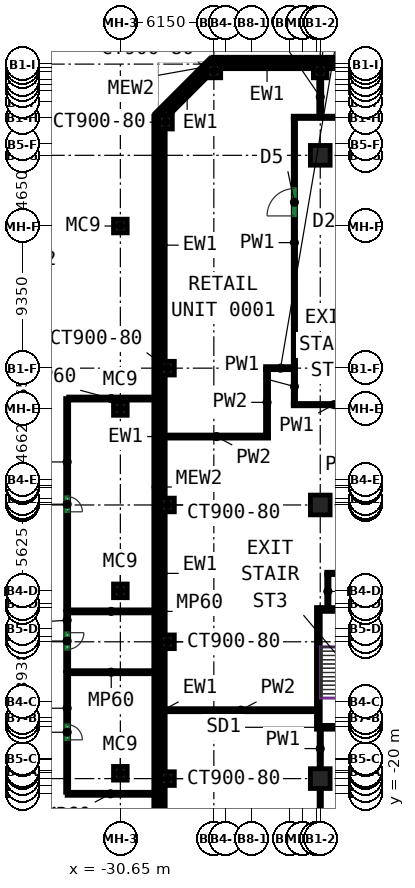
"""IFC4 building model, lengths in metres.
Left out: names, types, materials, properties, quantities, classifications, styles, units other than length and angle.
Written with IfcOpenShell. Run it as: python <this file> out.ifc"""

import sys

from ifc_helpers import new_model, si_unit, direction, frame, frame_2d, origin, origin_2d, place, context, subcontext, project, spatial, rectangle, extrude, source, transform, mapped, element, fill, save


model = new_model("IFC4")
c1 = context("Model", 3, precision=1e-05, world=origin(), true_north=direction((0.0, 1.0)))
c2 = subcontext(c1, "Body", "Model", "MODEL_VIEW")
j1 = project(units=[si_unit("LENGTHUNIT", "METRE"), si_unit("PLANEANGLEUNIT", "RADIAN")], contexts=[c1])
p1 = place(None, origin())
s1 = spatial("IfcSite", under=j1, at=p1, CompositionType="ELEMENT")
p2 = place(p1, origin())
s2 = spatial("IfcBuilding", under=s1, at=p2, CompositionType="ELEMENT")
p3 = place(p2, origin())
s3 = spatial("IfcBuildingStorey", under=s2, at=p3, CompositionType="ELEMENT", Elevation=0.0)
m1 = source(origin(), c2, "Body", "SweptSolid", [
    extrude(rectangle(XDim=0.9, YDim=0.9, at=origin_2d()), origin(), (0.0, 0.0, 1.0), 8.6),
])
for number, where, z_axis, x_axis in (
    (1, (-27.682, 24.182, 0.0), (0.0, 0.0, 1.0), (1.0, 0.0, 0.0)),
    (2, (-27.55, -19.0, 0.0), (0.0, 0.0, 1.0), (1.0, 0.0, 0.0)),
    (3, (-27.55, -10.0, 0.0), (0.0, 0.0, 1.0), (1.0, 0.0, 0.0)),
    (4, (-27.55, -1.0, 0.0), (0.0, 0.0, 1.0), (1.0, 0.0, 0.0)),
    (5, (-27.55, 8.0, 0.0), (0.0, 0.0, 1.0), (1.0, 0.0, 0.0)),
    (6, (-24.5, 27.55, 0.0), (0.0, 0.0, 1.0), (1.0, 0.0, 0.0)),
):
    element("IfcColumn", number, at=place(p3, frame(where, z_axis=z_axis, x_axis=x_axis)), inside=s3, PredefinedType="COLUMN", context=c2, shape_type="MappedRepresentation", body=[
        mapped(m1, transform((0.0, 0.0, 0.0))),
    ])
m2 = source(origin(), c2, "Body", "SweptSolid", [
    extrude(rectangle(XDim=1.3, YDim=1.3, at=origin_2d()), origin(), (0.0, 0.0, 1.0), 8.6),
])
for number, where, z_axis, x_axis in (
    (7, (-17.5, -19.0, 0.0), (0.0, 0.0, 1.0), (1.0, 0.0, 0.0)),
    (8, (-17.5, -1.0, 0.0), (0.0, 0.0, 1.0), (1.0, 0.0, 0.0)),
    (9, (-17.5, 8.0, 0.0), (0.0, 0.0, 1.0), (1.0, 0.0, 0.0)),
    (10, (-17.5, 22.0, 0.0), (0.0, 0.0, 1.0), (1.0, 0.0, 0.0)),
):
    element("IfcColumn", number, at=place(p3, frame(where, z_axis=z_axis, x_axis=x_axis)), inside=s3, PredefinedType="COLUMN", context=c2, shape_type="MappedRepresentation", body=[
        mapped(m2, transform((0.0, 0.0, 0.0))),
    ])
p4 = place(p3, frame((-17.5, 27.55, 0.0), z_axis=(0.0, 0.0, 1.0), x_axis=(1.0, 0.0, 0.0)))
e11 = element("IfcColumn", 11, at=p4, inside=s3, PredefinedType="COLUMN", context=c2, shape_type="MappedRepresentation", body=[
    mapped(m1, transform((0.0, 0.0, 0.0))),
])
m3 = source(origin(), c2, "Body", "SweptSolid", [
    extrude(rectangle(XDim=8.0, YDim=0.25, at=frame_2d((4.0, 0.0))), origin(), (0.0, 0.0, 1.0), 8.6),
])
p5 = place(p3, frame((-17.625, -15.75, 0.0), z_axis=(0.0, 0.0, 1.0), x_axis=(0.0, 1.0, 0.0)))
e12 = element("IfcWall", 12, at=p5, inside=s3, PredefinedType="SHEAR", context=c2, shape_type="MappedRepresentation", body=[
    mapped(m3, transform((0.0, 0.0, 0.0))),
])
m4 = source(origin(), c2, "Body", "SweptSolid", [
    extrude(rectangle(XDim=3.7, YDim=0.25, at=frame_2d((1.85, 0.0))), origin(), (0.0, 0.0, 1.0), 8.6),
])
p6 = place(p3, frame((-17.5, -15.625, 0.0), z_axis=(0.0, 0.0, 1.0), x_axis=(1.0, 0.0, 0.0)))
e13 = element("IfcWall", 13, at=p6, inside=s3, PredefinedType="SHEAR", context=c2, shape_type="MappedRepresentation", body=[
    mapped(m4, transform((0.0, 0.0, 0.0))),
])
p7 = place(p6, frame((2.5, 0.0, 0.0)))
e14 = element("IfcOpeningElement", 14, at=p7, cuts=e13, PredefinedType="OPENING", context=c2, shape_type="SweptSolid", body=[
    extrude(rectangle(XDim=1.2, YDim=2.1, at=frame_2d((0.6, 1.05))), frame((0.0, 0.135, 0.0), z_axis=(0.0, -1.0, 0.0), x_axis=(1.0, 0.0, 0.0)), (0.0, 0.0, 1.0), 0.27),
])
p8 = place(p3, frame((-17.5, -7.875, 0.0), z_axis=(0.0, 0.0, 1.0), x_axis=(1.0, 0.0, 0.0)))
e15 = element("IfcWall", 15, at=p8, inside=s3, PredefinedType="SHEAR", context=c2, shape_type="MappedRepresentation", body=[
    mapped(m4, transform((0.0, 0.0, 0.0))),
])
m5 = source(origin(), c2, "Body", "SweptSolid", [
    extrude(rectangle(XDim=0.9, YDim=0.9, at=origin_2d()), origin(), (0.0, 0.0, 1.0), 8.6),
])
for number, where, z_axis, x_axis in (
    (16, (-30.65, -18.65, 0.0), (0.0, 0.0, 1.0), (1.0, 0.0, 0.0)),
    (17, (-30.65, -6.65, 0.0), (0.0, 0.0, 1.0), (1.0, 0.0, 0.0)),
    (18, (-30.65, 5.35, 0.0), (0.0, 0.0, 1.0), (1.0, 0.0, 0.0)),
    (19, (-30.65, 17.35, 0.0), (0.0, 0.0, 1.0), (1.0, 0.0, 0.0)),
):
    element("IfcColumn", number, at=place(p3, frame(where, z_axis=z_axis, x_axis=x_axis)), inside=s3, PredefinedType="COLUMN", context=c2, shape_type="MappedRepresentation", body=[
        mapped(m5, transform((0.0, 0.0, 0.0))),
    ])
m6 = source(origin(), c2, "Body", "SweptSolid", [
    extrude(rectangle(XDim=6.1, YDim=0.3, at=frame_2d((3.05, 0.0))), origin(), (0.0, 0.0, 1.0), 8.6),
])
for number, where, z_axis, x_axis in (
    (20, (-10.95, 27.85, 0.0), (0.0, 0.0, 1.0), (-1.0, 0.0, 0.0)),
    (21, (-17.95, 27.85, 0.0), (0.0, 0.0, 1.0), (-1.0, 0.0, 0.0)),
):
    element("IfcWall", number, at=place(p3, frame(where, z_axis=z_axis, x_axis=x_axis)), inside=s3, PredefinedType="SOLIDWALL", context=c2, shape_type="MappedRepresentation", body=[
        mapped(m6, transform((0.0, 0.0, 0.0))),
    ])
m7 = source(origin(), c2, "Body", "SweptSolid", [
    extrude(rectangle(XDim=3.359, YDim=0.3, at=frame_2d((1.679, 0.0))), origin(), (0.0, 0.0, 1.0), 8.6),
])
p9 = place(p3, frame((-25.069, 27.219, 0.0), z_axis=(0.0, 0.0, 1.0), x_axis=(-0.707143122278, -0.707070438228, 0.0)))
e22 = element("IfcWall", 22, at=p9, inside=s3, PredefinedType="SOLIDWALL", context=c2, shape_type="MappedRepresentation", body=[
    mapped(m7, transform((0.0, 0.0, 0.0))),
])
m8 = source(origin(), c2, "Body", "SweptSolid", [
    extrude(rectangle(XDim=15.282, YDim=0.3, at=frame_2d((7.641, 0.0))), origin(), (0.0, 0.0, 1.0), 8.6),
])
p10 = place(p3, frame((-27.85, 23.732, 0.0), z_axis=(0.0, 0.0, 1.0), x_axis=(0.0, -1.0, 0.0)))
e23 = element("IfcWall", 23, at=p10, inside=s3, PredefinedType="SOLIDWALL", context=c2, shape_type="MappedRepresentation", body=[
    mapped(m8, transform((0.0, 0.0, 0.0))),
])
m9 = source(origin(), c2, "Body", "SweptSolid", [
    extrude(rectangle(XDim=8.1, YDim=0.3, at=frame_2d((4.05, 0.0))), origin(), (0.0, 0.0, 1.0), 8.6),
])
for number, where, z_axis, x_axis in (
    (24, (-27.85, 7.55, 0.0), (0.0, 0.0, 1.0), (0.0, -1.0, 0.0)),
    (25, (-27.85, -1.45, 0.0), (0.0, 0.0, 1.0), (0.0, -1.0, 0.0)),
    (26, (-27.85, -10.45, 0.0), (0.0, 0.0, 1.0), (0.0, -1.0, 0.0)),
):
    element("IfcWall", number, at=place(p3, frame(where, z_axis=z_axis, x_axis=x_axis)), inside=s3, PredefinedType="SOLIDWALL", context=c2, shape_type="MappedRepresentation", body=[
        mapped(m9, transform((0.0, 0.0, 0.0))),
    ])
m10 = source(origin(), c2, "Body", "SweptSolid", [
    extrude(rectangle(XDim=4.6, YDim=0.3, at=frame_2d((2.3, 0.0))), origin(), (0.0, 0.0, 1.0), 8.6),
])
p11 = place(p3, frame((-27.85, -19.45, 0.0), z_axis=(0.0, 0.0, 1.0), x_axis=(0.0, -1.0, 0.0)))
e27 = element("IfcWall", 27, at=p11, inside=s3, PredefinedType="SOLIDWALL", context=c2, shape_type="MappedRepresentation", body=[
    mapped(m10, transform((0.0, 0.0, 0.0))),
])
m11 = source(origin(), c2, "Body", "SweptSolid", [
    extrude(rectangle(XDim=48.762, YDim=0.3, at=frame_2d((24.381, 0.0))), origin(), (0.0, 0.0, 1.0), 8.6),
])
p12 = place(p3, frame((24.2, 28.3, 0.0), z_axis=(0.0, 0.0, 1.0), x_axis=(-1.0, 0.0, 0.0)))
e28 = element("IfcWall", 28, at=p12, inside=s3, PredefinedType="SOLIDWALL", context=c2, shape_type="MappedRepresentation", body=[
    mapped(m11, transform((0.0, 0.0, 0.0))),
])
m12 = source(origin(), c2, "Body", "SweptSolid", [
    extrude(rectangle(XDim=5.074, YDim=0.3, at=frame_2d((2.537, 0.0))), origin(), (0.0, 0.0, 1.0), 8.6),
])
p13 = place(p3, frame((-24.668, 28.256, 0.0), z_axis=(0.0, 0.0, 1.0), x_axis=(-0.707106781187, -0.707106781187, 0.0)))
e29 = element("IfcWall", 29, at=p13, inside=s3, PredefinedType="SOLIDWALL", context=c2, shape_type="MappedRepresentation", body=[
    mapped(m12, transform((0.0, 0.0, 0.0))),
])
p14 = place(p3, frame((-28.3, 24.562, 0.0), z_axis=(0.0, 0.0, 1.0), x_axis=(0.0, -1.0, 0.0)))
e30 = element("IfcWall", 30, at=p14, inside=s3, PredefinedType="SOLIDWALL", context=c2, shape_type="MappedRepresentation", body=[
    mapped(m11, transform((0.0, 0.0, 0.0))),
])
p15 = place(p3, frame((-17.5, -27.1, 0.0), z_axis=(0.0, 0.0, 1.0), x_axis=(0.0, 1.0, 0.0)))
e31 = element("IfcWall", 31, at=p15, inside=s3, PredefinedType="PARTITIONING", context=c2, shape_type="SweptSolid", body=[
    extrude(rectangle(XDim=7.45, YDim=0.15, at=frame_2d((3.725, 0.0))), origin(), (0.0, 0.0, 1.0), 7.95),
])
p16 = place(p15, frame((2.822, 0.0, 0.0)))
e32 = element("IfcOpeningElement", 32, at=p16, cuts=e31, PredefinedType="OPENING", context=c2, shape_type="SweptSolid", body=[
    extrude(rectangle(XDim=1.0, YDim=2.1, at=frame_2d((0.5, 1.05))), frame((0.0, 0.085, 0.0), z_axis=(0.0, -1.0, 0.0), x_axis=(1.0, 0.0, 0.0)), (0.0, 0.0, 1.0), 0.17),
])
p17 = place(p3, frame((-17.5, -18.35, 0.0), z_axis=(0.0, 0.0, 1.0), x_axis=(0.0, 1.0, 0.0)))
e33 = element("IfcWall", 33, at=p17, inside=s3, PredefinedType="PARTITIONING", context=c2, shape_type="SweptSolid", body=[
    extrude(rectangle(XDim=2.65, YDim=0.15, at=frame_2d((1.325, 0.0))), origin(), (0.0, 0.0, 1.0), 8.6),
])
p18 = place(p3, frame((-17.0, -5.575, 0.0), z_axis=(0.0, 0.0, 1.0), x_axis=(0.0, -1.0, 0.0)))
e34 = element("IfcWall", 34, at=p18, inside=s3, PredefinedType="PARTITIONING", context=c2, shape_type="SweptSolid", body=[
    extrude(rectangle(XDim=2.225, YDim=0.15, at=frame_2d((1.113, 0.0))), origin(), (0.0, 0.0, 1.0), 8.6),
])
p19 = place(p3, frame((-17.075, -5.5, 0.0), z_axis=(0.0, 0.0, 1.0), x_axis=(1.0, 0.0, 0.0)))
e35 = element("IfcWall", 35, at=p19, inside=s3, PredefinedType="PARTITIONING", context=c2, shape_type="SweptSolid", body=[
    extrude(rectangle(XDim=21.75, YDim=0.15, at=frame_2d((10.875, 0.0))), origin(), (0.0, 0.0, 1.0), 8.6),
])
p20 = place(p3, frame((-19.2, 8.09, 0.0), z_axis=(0.0, 0.0, 1.0), x_axis=(0.0, 1.0, 0.0)))
e36 = element("IfcWall", 36, at=p20, inside=s3, PredefinedType="PARTITIONING", context=c2, shape_type="SweptSolid", body=[
    extrude(rectangle(XDim=16.335, YDim=0.15, at=frame_2d((8.167, 0.0))), origin(), (0.0, 0.0, 1.0), 8.6),
])
p21 = place(p20, frame((9.924, 0.0, 0.0)))
e37 = element("IfcOpeningElement", 37, at=p21, cuts=e36, PredefinedType="OPENING", context=c2, shape_type="SweptSolid", body=[
    extrude(rectangle(XDim=1.8, YDim=2.1, at=frame_2d((0.9, 1.05))), frame((0.0, 0.085, 0.0), z_axis=(0.0, -1.0, 0.0), x_axis=(1.0, 0.0, 0.0)), (0.0, 0.0, 1.0), 0.17),
])
p22 = place(p3, frame((-19.275, 24.5, 0.0), z_axis=(0.0, 0.0, 1.0), x_axis=(1.0, 0.0, 0.0)))
e38 = element("IfcWall", 38, at=p22, inside=s3, PredefinedType="PARTITIONING", context=c2, shape_type="SweptSolid", body=[
    extrude(rectangle(XDim=40.35, YDim=0.15, at=frame_2d((20.175, 0.0))), origin(), (0.0, 0.0, 1.0), 7.95),
])
p23 = place(p22, frame((3.067, 0.0, 0.0)))
e39 = element("IfcOpeningElement", 39, at=p23, cuts=e38, PredefinedType="OPENING", context=c2, shape_type="SweptSolid", body=[
    extrude(rectangle(XDim=0.9, YDim=2.1, at=frame_2d((0.45, 1.05))), frame((0.0, 0.085, 0.0), z_axis=(0.0, -1.0, 0.0), x_axis=(1.0, 0.0, 0.0)), (0.0, 0.0, 1.0), 0.17),
])
p24 = place(p22, frame((14.169, 0.0, 0.0)))
e40 = element("IfcOpeningElement", 40, at=p24, cuts=e38, PredefinedType="OPENING", context=c2, shape_type="SweptSolid", body=[
    extrude(rectangle(XDim=1.0, YDim=2.1, at=frame_2d((0.5, 1.05))), frame((0.0, 0.085, 0.0), z_axis=(0.0, -1.0, 0.0), x_axis=(1.0, 0.0, 0.0)), (0.0, 0.0, 1.0), 0.17),
])
p25 = place(p22, frame((30.705, 0.0, 0.0)))
e41 = element("IfcOpeningElement", 41, at=p25, cuts=e38, PredefinedType="OPENING", context=c2, shape_type="SweptSolid", body=[
    extrude(rectangle(XDim=0.9, YDim=2.1, at=frame_2d((0.45, 1.05))), frame((0.0, 0.085, 0.0), z_axis=(0.0, -1.0, 0.0), x_axis=(1.0, 0.0, 0.0)), (0.0, 0.0, 1.0), 0.17),
])
p26 = place(p3, frame((-19.275, 5.6, 0.0), z_axis=(0.0, 0.0, 1.0), x_axis=(1.0, 0.0, 0.0)))
e42 = element("IfcWall", 42, at=p26, inside=s3, PredefinedType="PARTITIONING", context=c2, shape_type="SweptSolid", body=[
    extrude(rectangle(XDim=5.35, YDim=0.15, at=frame_2d((2.675, 0.0))), origin(), (0.0, 0.0, 1.0), 8.6),
])
p27 = place(p3, frame((-19.2, 5.675, 0.0), z_axis=(0.0, 0.0, 1.0), x_axis=(0.0, 1.0, 0.0)))
e43 = element("IfcWall", 43, at=p27, inside=s3, PredefinedType="PARTITIONING", context=c2, shape_type="SweptSolid", body=[
    extrude(rectangle(XDim=2.235, YDim=0.15, at=frame_2d((1.117, 0.0))), origin(), (0.0, 0.0, 1.0), 8.6),
])
p28 = place(p3, frame((-17.7, -14.5, 0.0), z_axis=(0.0, 0.0, 1.0), x_axis=(-1.0, 0.0, 0.0)))
e44 = element("IfcWall", 44, at=p28, inside=s3, PredefinedType="PARTITIONING", context=c2, shape_type="SweptSolid", body=[
    extrude(rectangle(XDim=10.05, YDim=0.2, at=frame_2d((5.025, 0.0))), origin(), (0.0, 0.0, 1.0), 8.6),
])
p29 = place(p3, frame((-21.1, 8.0, 0.0), z_axis=(0.0, 0.0, 1.0), x_axis=(1.0, 0.0, 0.0)))
e45 = element("IfcWall", 45, at=p29, inside=s3, PredefinedType="PARTITIONING", context=c2, shape_type="SweptSolid", body=[
    extrude(rectangle(XDim=1.974, YDim=0.2, at=frame_2d((0.987, 0.0))), origin(), (0.0, 0.0, 1.0), 7.95),
])
p30 = place(p3, frame((-21.0, 3.6, 0.0), z_axis=(0.0, 0.0, 1.0), x_axis=(0.0, 1.0, 0.0)))
e46 = element("IfcWall", 46, at=p30, inside=s3, PredefinedType="PARTITIONING", context=c2, shape_type="SweptSolid", body=[
    extrude(rectangle(XDim=4.3, YDim=0.2, at=frame_2d((2.15, 0.0))), origin(), (0.0, 0.0, 1.0), 8.6),
])
p31 = place(p3, frame((-27.75, 3.5, 0.0), z_axis=(0.0, 0.0, 1.0), x_axis=(1.0, 0.0, 0.0)))
e47 = element("IfcWall", 47, at=p31, inside=s3, PredefinedType="PARTITIONING", context=c2, shape_type="SweptSolid", body=[
    extrude(rectangle(XDim=6.85, YDim=0.2, at=frame_2d((3.425, 0.0))), origin(), (0.0, 0.0, 1.0), 8.6),
])
p32 = place(p3, frame((-17.5, 24.576, 0.0), z_axis=(0.0, 0.0, 1.0), x_axis=(0.0, 1.0, 0.0)))
e48 = element("IfcWall", 48, at=p32, inside=s3, PredefinedType="PARTITIONING", context=c2, shape_type="SweptSolid", body=[
    extrude(rectangle(XDim=2.524, YDim=0.2, at=frame_2d((1.262, 0.0))), origin(), (0.0, 0.0, 1.0), 7.95),
])
m13 = source(origin(), c2, "Body", "SweptSolid", [
    extrude(rectangle(XDim=5.7, YDim=0.2, at=frame_2d((2.85, 0.0))), origin(), (0.0, 0.0, 1.0), 7.7),
])
p33 = place(p3, frame((-34.15, -20.0, 0.0), z_axis=(0.0, 0.0, 1.0), x_axis=(1.0, 0.0, 0.0)))
e49 = element("IfcWall", 49, at=p33, inside=s3, PredefinedType="PARTITIONING", context=c2, shape_type="MappedRepresentation", body=[
    mapped(m13, transform((0.0, 0.0, 0.0))),
])
m14 = source(origin(), c2, "Body", "SweptSolid", [
    extrude(rectangle(XDim=7.9, YDim=0.2, at=frame_2d((3.95, 0.0))), origin(), (0.0, 0.0, 1.0), 7.7),
])
p34 = place(p3, frame((-34.15, -12.0, 0.0), z_axis=(0.0, 0.0, 1.0), x_axis=(0.0, -1.0, 0.0)))
e50 = element("IfcWall", 50, at=p34, inside=s3, PredefinedType="PARTITIONING", context=c2, shape_type="MappedRepresentation", body=[
    mapped(m14, transform((0.0, 0.0, 0.0))),
])
p35 = place(p34, frame((3.45, 0.0, 0.0)))
e51 = element("IfcOpeningElement", 51, at=p35, cuts=e50, PredefinedType="OPENING", context=c2, shape_type="SweptSolid", body=[
    extrude(rectangle(XDim=1.0, YDim=2.1, at=frame_2d((0.5, 1.05))), frame((0.0, 0.11, 0.0), z_axis=(0.0, -1.0, 0.0), x_axis=(1.0, 0.0, 0.0)), (0.0, 0.0, 1.0), 0.22),
])
m15 = source(origin(), c2, "Body", "SweptSolid", [
    extrude(rectangle(XDim=5.6, YDim=0.2, at=frame_2d((2.8, 0.0))), origin(), (0.0, 0.0, 1.0), 7.7),
])
p36 = place(p3, frame((-34.05, -12.0, 0.0), z_axis=(0.0, 0.0, 1.0), x_axis=(1.0, 0.0, 0.0)))
e52 = element("IfcWall", 52, at=p36, inside=s3, PredefinedType="PARTITIONING", context=c2, shape_type="MappedRepresentation", body=[
    mapped(m15, transform((0.0, 0.0, 0.0))),
])
m16 = source(origin(), c2, "Body", "SweptSolid", [
    extrude(rectangle(XDim=3.9, YDim=0.2, at=frame_2d((1.95, 0.0))), origin(), (0.0, 0.0, 1.0), 8.6),
])
p37 = place(p3, frame((-34.15, -8.0, 0.0), z_axis=(0.0, 0.0, 1.0), x_axis=(0.0, -1.0, 0.0)))
e53 = element("IfcWall", 53, at=p37, inside=s3, PredefinedType="PARTITIONING", context=c2, shape_type="MappedRepresentation", body=[
    mapped(m16, transform((0.0, 0.0, 0.0))),
])
p38 = place(p37, frame((1.4, 0.0, 0.0)))
e54 = element("IfcOpeningElement", 54, at=p38, cuts=e53, PredefinedType="OPENING", context=c2, shape_type="SweptSolid", body=[
    extrude(rectangle(XDim=1.1, YDim=2.1, at=frame_2d((0.55, 1.05))), frame((0.0, 0.11, 0.0), z_axis=(0.0, -1.0, 0.0), x_axis=(1.0, 0.0, 0.0)), (0.0, 0.0, 1.0), 0.22),
])
p39 = place(p3, frame((-34.05, -8.0, 0.0), z_axis=(0.0, 0.0, 1.0), x_axis=(1.0, 0.0, 0.0)))
e55 = element("IfcWall", 55, at=p39, inside=s3, PredefinedType="PARTITIONING", context=c2, shape_type="MappedRepresentation", body=[
    mapped(m15, transform((0.0, 0.0, 0.0))),
])
m17 = source(origin(), c2, "Body", "SweptSolid", [
    extrude(rectangle(XDim=13.9, YDim=0.2, at=frame_2d((6.95, 0.0))), origin(), (0.0, 0.0, 1.0), 7.7),
])
p40 = place(p3, frame((-34.15, 6.0, 0.0), z_axis=(0.0, 0.0, 1.0), x_axis=(0.0, -1.0, 0.0)))
e56 = element("IfcWall", 56, at=p40, inside=s3, PredefinedType="PARTITIONING", context=c2, shape_type="MappedRepresentation", body=[
    mapped(m17, transform((0.0, 0.0, 0.0))),
])
p41 = place(p40, frame((6.45, 0.0, 0.0)))
e57 = element("IfcOpeningElement", 57, at=p41, cuts=e56, PredefinedType="OPENING", context=c2, shape_type="SweptSolid", body=[
    extrude(rectangle(XDim=1.0, YDim=2.1, at=frame_2d((0.5, 1.05))), frame((0.0, 0.11, 0.0), z_axis=(0.0, -1.0, 0.0), x_axis=(1.0, 0.0, 0.0)), (0.0, 0.0, 1.0), 0.22),
])
p42 = place(p3, frame((-28.45, 6.0, 0.0), z_axis=(0.0, 0.0, 1.0), x_axis=(-1.0, 0.0, 0.0)))
e58 = element("IfcWall", 58, at=p42, inside=s3, PredefinedType="PARTITIONING", context=c2, shape_type="MappedRepresentation", body=[
    mapped(m15, transform((0.0, 0.0, 0.0))),
])
p43 = place(p21, origin())
e59 = element("IfcDoor", 59, at=p43, inside=s3, OperationType="DOUBLE_DOOR_SINGLE_SWING", PredefinedType="DOOR", context=c2, shape_type="SweptSolid", body=[
    extrude(rectangle(XDim=1.8, YDim=2.1, at=frame_2d((0.9, 1.05))), frame((0.0, 0.025, 0.0), z_axis=(0.0, -1.0, 0.0), x_axis=(1.0, 0.0, 0.0)), (0.0, 0.0, 1.0), 0.05),
])
fill(e37, e59)
p44 = place(p35, origin())
e60 = element("IfcDoor", 60, at=p44, inside=s3, OperationType="SINGLE_SWING_RIGHT", PredefinedType="DOOR", context=c2, shape_type="SweptSolid", body=[
    extrude(rectangle(XDim=1.0, YDim=2.1, at=frame_2d((0.5, 1.05))), frame((0.0, 0.025, 0.0), z_axis=(0.0, -1.0, 0.0), x_axis=(1.0, 0.0, 0.0)), (0.0, 0.0, 1.0), 0.05),
])
fill(e51, e60)
p45 = place(p38, origin())
e61 = element("IfcDoor", 61, at=p45, inside=s3, OperationType="SINGLE_SWING_LEFT", PredefinedType="DOOR", context=c2, shape_type="SweptSolid", body=[
    extrude(rectangle(XDim=1.1, YDim=2.1, at=frame_2d((0.55, 1.05))), frame((0.0, 0.025, 0.0), z_axis=(0.0, -1.0, 0.0), x_axis=(1.0, 0.0, 0.0)), (0.0, 0.0, 1.0), 0.05),
])
fill(e54, e61)
p46 = place(p41, origin())
e62 = element("IfcDoor", 62, at=p46, inside=s3, OperationType="SINGLE_SWING_RIGHT", PredefinedType="DOOR", context=c2, shape_type="SweptSolid", body=[
    extrude(rectangle(XDim=1.0, YDim=2.1, at=frame_2d((0.5, 1.05))), frame((0.0, 0.025, 0.0), z_axis=(0.0, -1.0, 0.0), x_axis=(1.0, 0.0, 0.0)), (0.0, 0.0, 1.0), 0.05),
])
fill(e57, e62)
save(model, sys.argv[1])
